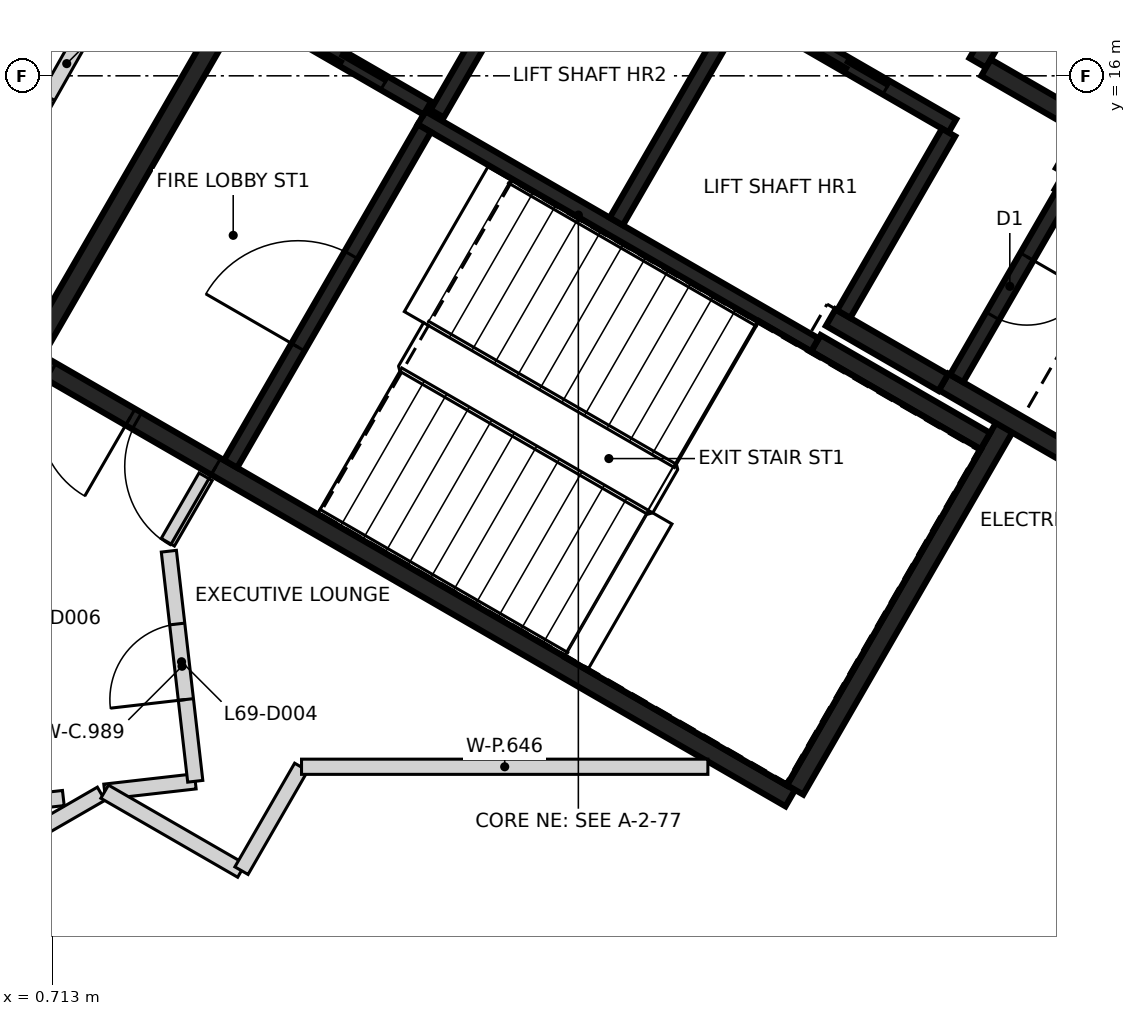
"""IFC4 building model, lengths in metres.
Left out: names, types, materials, properties, quantities, classifications, styles, units other than length and angle.
Written with IfcOpenShell. Run it as: python <this file> out.ifc"""

import sys

from ifc_helpers import new_model, si_unit, direction, frame, frame_2d, origin, place, context, subcontext, project, spatial, rectangle, extrude, element, fill, save


model = new_model("IFC4")
c1 = context("Model", 3, precision=1e-05, world=origin(), true_north=direction((0.0, 1.0)))
c2 = subcontext(c1, "Body", "Model", "MODEL_VIEW")
j1 = project(units=[si_unit("LENGTHUNIT", "METRE"), si_unit("PLANEANGLEUNIT", "RADIAN")], contexts=[c1])
p1 = place(None, origin())
s1 = spatial("IfcSite", under=j1, at=p1, CompositionType="ELEMENT")
p2 = place(p1, origin())
s2 = spatial("IfcBuilding", under=s1, at=p2, CompositionType="ELEMENT")
p3 = place(p2, frame((0.0, 0.0, 273.0)))
s3 = spatial("IfcBuildingStorey", under=s2, at=p3, CompositionType="ELEMENT", Elevation=273.0)
p4 = place(p3, frame((10.42, 6.498, 0.0), z_axis=(0.0, 0.0, 1.0), x_axis=(-0.866021906294, 0.500006057782, 0.0)))
e1 = element("IfcWall", 1, at=p4, inside=s3, PredefinedType="SHEAR", context=c2, shape_type="SweptSolid", body=[
    extrude(rectangle(XDim=11.55, YDim=0.25, at=frame_2d((5.775, 0.0))), origin(), (0.0, 0.0, 1.0), 3.25),
])
p5 = place(p4, frame((10.025, 0.0, 0.0)))
e2 = element("IfcOpeningElement", 2, at=p5, cuts=e1, PredefinedType="OPENING", context=c2, shape_type="SweptSolid", body=[
    extrude(rectangle(XDim=1.2, YDim=2.1, at=frame_2d((0.6, 1.05))), frame((0.0, 0.135, 0.0), z_axis=(0.0, -1.0, 0.0), x_axis=(1.0, 0.0, 0.0)), (0.0, 0.0, 1.0), 0.27),
])
p6 = place(p4, frame((8.725, 0.0, 0.0)))
e3 = element("IfcOpeningElement", 3, at=p6, cuts=e1, PredefinedType="OPENING", context=c2, shape_type="SweptSolid", body=[
    extrude(rectangle(XDim=1.2, YDim=2.1, at=frame_2d((0.6, 1.05))), frame((0.0, 0.135, 0.0), z_axis=(0.0, -1.0, 0.0), x_axis=(1.0, 0.0, 0.0)), (0.0, 0.0, 1.0), 0.27),
])
p7 = place(p3, frame((0.48, 12.381, 0.0), z_axis=(0.0, 0.0, 1.0), x_axis=(0.49999885962, 0.866026062182, 0.0)))
e4 = element("IfcWall", 4, at=p7, inside=s3, PredefinedType="SHEAR", context=c2, shape_type="SweptSolid", body=[
    extrude(rectangle(XDim=5.225, YDim=0.25, at=frame_2d((2.612, 0.0))), origin(), (0.0, 0.0, 1.0), 3.25),
])
p8 = place(p3, frame((13.238, 11.378, 0.0), z_axis=(0.0, 0.0, 1.0), x_axis=(-0.500008851346, -0.866020293397, 0.0)))
e5 = element("IfcWall", 5, at=p8, inside=s3, PredefinedType="SHEAR", context=c2, shape_type="SweptSolid", body=[
    extrude(rectangle(XDim=5.51, YDim=0.25, at=frame_2d((2.755, 0.0))), origin(), (0.0, 0.0, 1.0), 3.25),
])
p9 = place(p3, frame((14.918, 10.54, 0.0), z_axis=(0.0, 0.0, 1.0), x_axis=(-0.866063538972, 0.499933942099, 0.0)))
e6 = element("IfcWall", 6, at=p9, inside=s3, PredefinedType="SHEAR", context=c2, shape_type="SweptSolid", body=[
    extrude(rectangle(XDim=2.865, YDim=0.25, at=frame_2d((1.432, 0.0))), origin(), (0.0, 0.0, 1.0), 3.25),
])
p10 = place(p3, frame((13.963, 14.614, 0.0), z_axis=(0.0, 0.0, 1.0), x_axis=(0.866042235819, -0.499970844928, 0.0)))
e7 = element("IfcWall", 7, at=p10, inside=s3, PredefinedType="SHEAR", context=c2, shape_type="SweptSolid", body=[
    extrude(rectangle(XDim=2.865, YDim=0.25, at=frame_2d((1.432, 0.0))), origin(), (0.0, 0.0, 1.0), 3.25),
])
p11 = place(p3, frame((10.757, 12.481, 0.0), z_axis=(0.0, 0.0, 1.0), x_axis=(0.866022940537, -0.500004266446, 0.0)))
e8 = element("IfcWall", 8, at=p11, inside=s3, PredefinedType="SHEAR", context=c2, shape_type="SweptSolid", body=[
    extrude(rectangle(XDim=2.575, YDim=0.25, at=frame_2d((1.287, 0.0))), origin(), (0.0, 0.0, 1.0), 3.25),
])
p12 = place(p3, frame((13.819, 17.785, 0.0), z_axis=(0.0, 0.0, 1.0), x_axis=(-0.500039802285, -0.866002422705, 0.0)))
e9 = element("IfcWall", 9, at=p12, inside=s3, PredefinedType="SHEAR", context=c2, shape_type="SweptSolid", body=[
    extrude(rectangle(XDim=1.865, YDim=0.25, at=frame_2d((0.932, 0.0))), origin(), (0.0, 0.0, 1.0), 3.25),
])
p13 = place(p3, frame((12.433, 11.964, 0.0), z_axis=(0.0, 0.0, 1.0), x_axis=(-0.866038183914, 0.499977863513, 0.0)))
e10 = element("IfcWall", 10, at=p13, inside=s3, PredefinedType="SHEAR", context=c2, shape_type="SweptSolid", body=[
    extrude(rectangle(XDim=1.71, YDim=0.25, at=frame_2d((0.855, 0.0))), origin(), (0.0, 0.0, 1.0), 3.25),
])
p14 = place(p3, frame((12.995, 16.108, 0.0), z_axis=(0.0, 0.0, 1.0), x_axis=(0.866044474677, -0.49996696679, 0.0)))
e11 = element("IfcWall", 11, at=p14, inside=s3, PredefinedType="SHEAR", context=c2, shape_type="SweptSolid", body=[
    extrude(rectangle(XDim=1.584, YDim=0.25, at=frame_2d((0.792, 0.0))), origin(), (0.0, 0.0, 1.0), 3.25),
])
p15 = place(p3, frame((14.305, 15.207, 0.0), z_axis=(0.0, 0.0, 1.0), x_axis=(-0.499848422343, -0.866112899501, 0.0)))
e12 = element("IfcWall", 12, at=p15, inside=s3, PredefinedType="SHEAR", context=c2, shape_type="SweptSolid", body=[
    extrude(rectangle(XDim=0.559, YDim=0.25, at=frame_2d((0.28, 0.0))), origin(), (0.0, 0.0, 1.0), 3.25),
])
p16 = place(p3, frame((12.552, 15.342, 0.0), z_axis=(0.0, 0.0, 1.0), x_axis=(-0.866030299012, 0.499991521122, 0.0)))
e13 = element("IfcWall", 13, at=p16, inside=s3, PredefinedType="SHEAR", context=c2, shape_type="SweptSolid", body=[
    extrude(rectangle(XDim=6.1, YDim=0.2, at=frame_2d((3.05, 0.0))), origin(), (0.0, 0.0, 1.0), 3.25),
])
p17 = place(p16, frame((1.0, 0.0, 0.0)))
e14 = element("IfcOpeningElement", 14, at=p17, cuts=e13, PredefinedType="OPENING", context=c2, shape_type="SweptSolid", body=[
    extrude(rectangle(XDim=1.2, YDim=2.1, at=frame_2d((0.6, 1.05))), frame((0.0, 0.11, 0.0), z_axis=(0.0, -1.0, 0.0), x_axis=(1.0, 0.0, 0.0)), (0.0, 0.0, 1.0), 0.22),
])
p18 = place(p16, frame((3.982, 0.0, 0.0)))
e15 = element("IfcOpeningElement", 15, at=p18, cuts=e13, PredefinedType="OPENING", context=c2, shape_type="SweptSolid", body=[
    extrude(rectangle(XDim=1.2, YDim=2.1, at=frame_2d((0.6, 1.05))), frame((0.0, 0.11, 0.0), z_axis=(0.0, -1.0, 0.0), x_axis=(1.0, 0.0, 0.0)), (0.0, 0.0, 1.0), 0.22),
])
p19 = place(p3, frame((10.743, 12.46, 0.0), z_axis=(0.0, 0.0, 1.0), x_axis=(-0.866018848283, 0.500011354289, 0.0)))
e16 = element("IfcWall", 16, at=p19, inside=s3, PredefinedType="SHEAR", context=c2, shape_type="SweptSolid", body=[
    extrude(rectangle(XDim=5.974, YDim=0.2, at=frame_2d((2.987, 0.0))), origin(), (0.0, 0.0, 1.0), 3.25),
])
p20 = place(p3, frame((3.057, 10.895, 0.0), z_axis=(0.0, 0.0, 1.0), x_axis=(0.500027839223, 0.866009330205, 0.0)))
e17 = element("IfcWall", 17, at=p20, inside=s3, PredefinedType="SHEAR", context=c2, shape_type="SweptSolid", body=[
    extrude(rectangle(XDim=5.098, YDim=0.2, at=frame_2d((2.549, 0.0))), origin(), (0.0, 0.0, 1.0), 3.25),
])
p21 = place(p20, frame((1.774, 0.0, 0.0)))
e18 = element("IfcOpeningElement", 18, at=p21, cuts=e17, PredefinedType="OPENING", context=c2, shape_type="SweptSolid", body=[
    extrude(rectangle(XDim=1.4, YDim=2.1, at=frame_2d((0.7, 1.05))), frame((0.0, 0.11, 0.0), z_axis=(0.0, -1.0, 0.0), x_axis=(1.0, 0.0, 0.0)), (0.0, 0.0, 1.0), 0.22),
])
p22 = place(p3, frame((8.132, 14.084, 0.0), z_axis=(0.0, 0.0, 1.0), x_axis=(0.500030834389, 0.86600760081, 0.0)))
e19 = element("IfcWall", 19, at=p22, inside=s3, PredefinedType="SHEAR", context=c2, shape_type="SweptSolid", body=[
    extrude(rectangle(XDim=3.198, YDim=0.2, at=frame_2d((1.599, 0.0))), origin(), (0.0, 0.0, 1.0), 3.25),
])
p23 = place(p3, frame((14.008, 14.442, 0.0), z_axis=(0.0, 0.0, 1.0), x_axis=(-0.499986818241, -0.866033014143, 0.0)))
e20 = element("IfcWall", 20, at=p23, inside=s3, PredefinedType="SHEAR", context=c2, shape_type="SweptSolid", body=[
    extrude(rectangle(XDim=2.798, YDim=0.2, at=frame_2d((1.399, 0.0))), origin(), (0.0, 0.0, 1.0), 3.25),
])
p24 = place(p23, frame((0.949, 0.0, 0.0)))
e21 = element("IfcOpeningElement", 21, at=p24, cuts=e20, PredefinedType="OPENING", context=c2, shape_type="SweptSolid", body=[
    extrude(rectangle(XDim=0.9, YDim=2.1, at=frame_2d((0.45, 1.05))), frame((0.0, 0.11, 0.0), z_axis=(0.0, -1.0, 0.0), x_axis=(1.0, 0.0, 0.0)), (0.0, 0.0, 1.0), 0.22),
])
p25 = place(p3, frame((12.502, 15.255, 0.0), z_axis=(0.0, 0.0, 1.0), x_axis=(-0.499965018551, -0.866045599391, 0.0)))
e22 = element("IfcWall", 22, at=p25, inside=s3, PredefinedType="SHEAR", context=c2, shape_type="SweptSolid", body=[
    extrude(rectangle(XDim=2.759, YDim=0.2, at=frame_2d((1.379, 0.0))), origin(), (0.0, 0.0, 1.0), 3.25),
])
p26 = place(p3, frame((7.324, 18.187, 0.0), z_axis=(0.0, 0.0, 1.0), x_axis=(-0.499967891604, -0.866043940782, 0.0)))
e23 = element("IfcWall", 23, at=p26, inside=s3, PredefinedType="SHEAR", context=c2, shape_type="SweptSolid", body=[
    extrude(rectangle(XDim=3.1, YDim=0.2, at=frame_2d((1.55, 0.0))), origin(), (0.0, 0.0, 1.0), 3.25),
])
p27 = place(p3, frame((5.646, 15.576, 0.0), z_axis=(0.0, 0.0, 1.0), x_axis=(-0.866018407898, 0.500012117035, 0.0)))
e24 = element("IfcWall", 24, at=p27, inside=s3, PredefinedType="SHEAR", context=c2, shape_type="SweptSolid", body=[
    extrude(rectangle(XDim=2.651, YDim=0.2, at=frame_2d((1.325, 0.0))), origin(), (0.0, 0.0, 1.0), 3.25),
])
p28 = place(p27, frame((0.652, 0.0, 0.0)))
e25 = element("IfcOpeningElement", 25, at=p28, cuts=e24, PredefinedType="OPENING", context=c2, shape_type="SweptSolid", body=[
    extrude(rectangle(XDim=1.3, YDim=2.1, at=frame_2d((0.65, 1.05))), frame((0.0, 0.11, 0.0), z_axis=(0.0, -1.0, 0.0), x_axis=(1.0, 0.0, 0.0)), (0.0, 0.0, 1.0), 0.22),
])
p29 = place(p3, frame((-6.4, 2.079, 0.0), z_axis=(0.0, 0.0, 1.0), x_axis=(0.866044821263, 0.499966366432, 0.0)))
e26 = element("IfcWall", 26, at=p29, inside=s3, PredefinedType="PARTITIONING", context=c2, shape_type="SweptSolid", body=[
    extrude(rectangle(XDim=8.953, YDim=0.2, at=frame_2d((4.477, 0.0))), origin(), (0.0, 0.0, 1.0), 3.25),
])
p30 = place(p29, frame((4.003, 0.0, 0.0)))
e27 = element("IfcOpeningElement", 27, at=p30, cuts=e26, PredefinedType="OPENING", context=c2, shape_type="SweptSolid", body=[
    extrude(rectangle(XDim=1.0, YDim=2.1, at=frame_2d((0.5, 1.05))), frame((0.0, 0.11, 0.0), z_axis=(0.0, -1.0, 0.0), x_axis=(1.0, 0.0, 0.0)), (0.0, 0.0, 1.0), 0.22),
])
p31 = place(p3, frame((-1.086, 12.65, 0.0), z_axis=(0.0, 0.0, 1.0), x_axis=(0.492563383526, 0.870276572826, 0.0)))
e28 = element("IfcWall", 28, at=p31, inside=s3, PredefinedType="PARTITIONING", context=c2, shape_type="SweptSolid", body=[
    extrude(rectangle(XDim=6.309, YDim=0.2, at=frame_2d((3.155, 0.0))), origin(), (0.0, 0.0, 1.0), 3.25),
])
p32 = place(p31, frame((3.533, 0.0, 0.0)))
e29 = element("IfcOpeningElement", 29, at=p32, cuts=e28, PredefinedType="OPENING", context=c2, shape_type="SweptSolid", body=[
    extrude(rectangle(XDim=1.0, YDim=2.1, at=frame_2d((0.5, 1.05))), frame((0.0, 0.11, 0.0), z_axis=(0.0, -1.0, 0.0), x_axis=(1.0, 0.0, 0.0)), (0.0, 0.0, 1.0), 0.22),
])
p33 = place(p3, frame((0.286, 6.434, 0.0), z_axis=(0.0, 0.0, 1.0), x_axis=(0.993674480486, 0.112298828274, 0.0)))
e30 = element("IfcWall", 30, at=p33, inside=s3, PredefinedType="PARTITIONING", context=c2, shape_type="SweptSolid", body=[
    extrude(rectangle(XDim=0.574, YDim=0.2, at=frame_2d((0.287, 0.0))), origin(), (0.0, 0.0, 1.0), 3.25),
])
p34 = place(p3, frame((1.4, 6.582, 0.0), z_axis=(0.0, 0.0, 1.0), x_axis=(0.993556915844, 0.11333426216, 0.0)))
e31 = element("IfcWall", 31, at=p34, inside=s3, PredefinedType="PARTITIONING", context=c2, shape_type="SweptSolid", body=[
    extrude(rectangle(XDim=1.2, YDim=0.2, at=frame_2d((0.6, 0.0))), origin(), (0.0, 0.0, 1.0), 3.25),
])
p35 = place(p3, frame((1.4, 6.582, 0.0), z_axis=(0.0, 0.0, 1.0), x_axis=(0.866066271601, -0.499929208183, 0.0)))
e32 = element("IfcWall", 32, at=p35, inside=s3, PredefinedType="PARTITIONING", context=c2, shape_type="SweptSolid", body=[
    extrude(rectangle(XDim=2.078, YDim=0.2, at=frame_2d((1.039, 0.0))), origin(), (0.0, 0.0, 1.0), 3.25),
])
p36 = place(p3, frame((2.592, 6.719, 0.0), z_axis=(0.0, 0.0, 1.0), x_axis=(-0.114027951455, 0.993477541914, 0.0)))
e33 = element("IfcWall", 33, at=p36, inside=s3, PredefinedType="PARTITIONING", context=c2, shape_type="SweptSolid", body=[
    extrude(rectangle(XDim=3.047, YDim=0.2, at=frame_2d((1.523, 0.0))), origin(), (0.0, 0.0, 1.0), 3.25),
])
p37 = place(p36, frame((1.083, 0.0, 0.0)))
e34 = element("IfcOpeningElement", 34, at=p37, cuts=e33, PredefinedType="OPENING", context=c2, shape_type="SweptSolid", body=[
    extrude(rectangle(XDim=1.0, YDim=2.1, at=frame_2d((0.5, 1.05))), frame((0.0, 0.11, 0.0), z_axis=(0.0, -1.0, 0.0), x_axis=(1.0, 0.0, 0.0)), (0.0, 0.0, 1.0), 0.22),
])
p38 = place(p3, frame((2.231, 9.864, 0.0), z_axis=(0.0, 0.0, 1.0), x_axis=(0.499942098031, 0.866058830921, 0.0)))
e35 = element("IfcWall", 35, at=p38, inside=s3, PredefinedType="PARTITIONING", context=c2, shape_type="SweptSolid", body=[
    extrude(rectangle(XDim=0.994, YDim=0.2, at=frame_2d((0.497, 0.0))), origin(), (0.0, 0.0, 1.0), 3.25),
])
p39 = place(p3, frame((3.2, 5.543, 0.0), z_axis=(0.0, 0.0, 1.0), x_axis=(0.499342032259, 0.86640494852, 0.0)))
e36 = element("IfcWall", 36, at=p39, inside=s3, PredefinedType="PARTITIONING", context=c2, shape_type="SweptSolid", body=[
    extrude(rectangle(XDim=1.574, YDim=0.2, at=frame_2d((0.787, 0.0))), origin(), (0.0, 0.0, 1.0), 3.25),
])
p40 = place(p3, frame((3.99, 6.91, 0.0), z_axis=(0.0, 0.0, 1.0), x_axis=(1.0, 0.0, 0.0)))
e37 = element("IfcWall", 37, at=p40, inside=s3, PredefinedType="PARTITIONING", context=c2, shape_type="SweptSolid", body=[
    extrude(rectangle(XDim=5.346, YDim=0.2, at=frame_2d((2.673, 0.0))), origin(), (0.0, 0.0, 1.0), 3.25),
])
p41 = place(p28, origin())
e38 = element("IfcDoor", 38, at=p41, inside=s3, OperationType="SLIDING_TO_RIGHT", PredefinedType="DOOR", context=c2, shape_type="SweptSolid", body=[
    extrude(rectangle(XDim=1.3, YDim=2.1, at=frame_2d((0.65, 1.05))), frame((0.0, 0.025, 0.0), z_axis=(0.0, -1.0, 0.0), x_axis=(1.0, 0.0, 0.0)), (0.0, 0.0, 1.0), 0.05),
])
fill(e25, e38)
p42 = place(p17, origin())
e39 = element("IfcDoor", 39, at=p42, inside=s3, OperationType="DOUBLE_DOOR_SLIDING", PredefinedType="DOOR", context=c2, shape_type="SweptSolid", body=[
    extrude(rectangle(XDim=1.2, YDim=2.1, at=frame_2d((0.6, 1.05))), frame((0.0, 0.025, 0.0), z_axis=(0.0, -1.0, 0.0), x_axis=(1.0, 0.0, 0.0)), (0.0, 0.0, 1.0), 0.05),
])
fill(e14, e39)
p43 = place(p5, origin())
e40 = element("IfcDoor", 40, at=p43, inside=s3, OperationType="SINGLE_SWING_LEFT", PredefinedType="DOOR", context=c2, shape_type="SweptSolid", body=[
    extrude(rectangle(XDim=1.2, YDim=2.1, at=frame_2d((0.6, 1.05))), frame((0.0, 0.025, 0.0), z_axis=(0.0, -1.0, 0.0), x_axis=(1.0, 0.0, 0.0)), (0.0, 0.0, 1.0), 0.05),
])
fill(e2, e40)
p44 = place(p6, origin())
e41 = element("IfcDoor", 41, at=p44, inside=s3, OperationType="SINGLE_SWING_RIGHT", PredefinedType="DOOR", context=c2, shape_type="SweptSolid", body=[
    extrude(rectangle(XDim=1.2, YDim=2.1, at=frame_2d((0.6, 1.05))), frame((0.0, 0.025, 0.0), z_axis=(0.0, -1.0, 0.0), x_axis=(1.0, 0.0, 0.0)), (0.0, 0.0, 1.0), 0.05),
])
fill(e3, e41)
p45 = place(p21, origin())
e42 = element("IfcDoor", 42, at=p45, inside=s3, OperationType="SINGLE_SWING_RIGHT", PredefinedType="DOOR", context=c2, shape_type="SweptSolid", body=[
    extrude(rectangle(XDim=1.4, YDim=2.1, at=frame_2d((0.7, 1.05))), frame((0.0, 0.025, 0.0), z_axis=(0.0, -1.0, 0.0), x_axis=(1.0, 0.0, 0.0)), (0.0, 0.0, 1.0), 0.05),
])
fill(e18, e42)
p46 = place(p24, origin())
e43 = element("IfcDoor", 43, at=p46, inside=s3, OperationType="SINGLE_SWING_LEFT", PredefinedType="DOOR", context=c2, shape_type="SweptSolid", body=[
    extrude(rectangle(XDim=0.9, YDim=2.1, at=frame_2d((0.45, 1.05))), frame((0.0, 0.025, 0.0), z_axis=(0.0, -1.0, 0.0), x_axis=(1.0, 0.0, 0.0)), (0.0, 0.0, 1.0), 0.05),
])
fill(e21, e43)
p47 = place(p37, origin())
e44 = element("IfcDoor", 44, at=p47, inside=s3, OperationType="SINGLE_SWING_LEFT", PredefinedType="DOOR", context=c2, shape_type="SweptSolid", body=[
    extrude(rectangle(XDim=1.0, YDim=2.1, at=frame_2d((0.5, 1.05))), frame((0.0, 0.025, 0.0), z_axis=(0.0, -1.0, 0.0), x_axis=(1.0, 0.0, 0.0)), (0.0, 0.0, 1.0), 0.05),
])
fill(e34, e44)
p48 = place(p32, frame((1.0, 0.0, 0.0), z_axis=(0.0, 0.0, 1.0), x_axis=(-1.0, 0.0, 0.0)))
e45 = element("IfcDoor", 45, at=p48, inside=s3, OperationType="SINGLE_SWING_LEFT", PredefinedType="DOOR", context=c2, shape_type="SweptSolid", body=[
    extrude(rectangle(XDim=1.0, YDim=2.1, at=frame_2d((0.5, 1.05))), frame((0.0, 0.025, 0.0), z_axis=(0.0, -1.0, 0.0), x_axis=(1.0, 0.0, 0.0)), (0.0, 0.0, 1.0), 0.05),
])
fill(e29, e45)
save(model, sys.argv[1])
